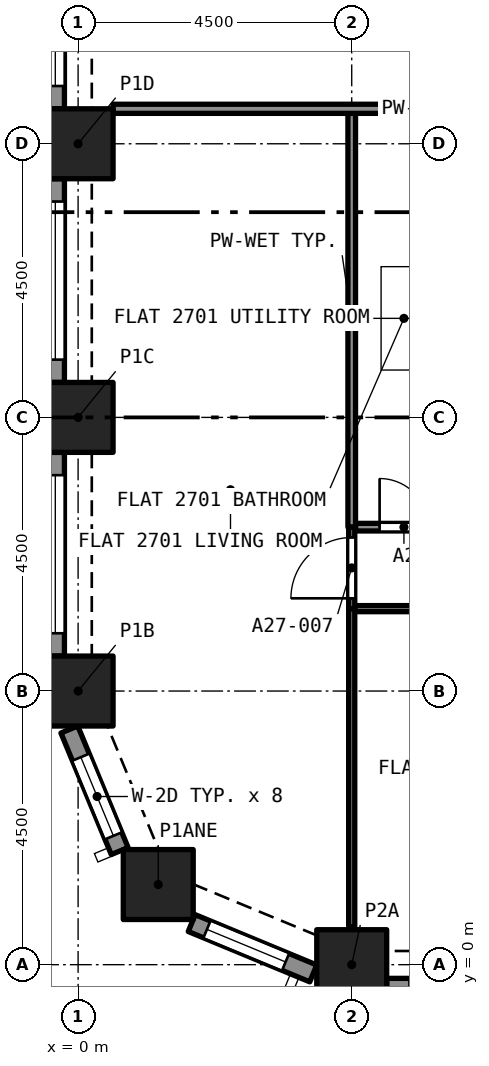
"""IFC4 building model, lengths in metres.
Left out: names, types, materials, properties, quantities, classifications, styles, units other than length and angle.
Written with IfcOpenShell. Run it as: python <this file> out.ifc"""

import sys

from ifc_helpers import new_model, si_unit, direction, frame, frame_2d, origin, origin_2d, place, context, subcontext, project, spatial, rectangle, extrude, element, fill, save


model = new_model("IFC4")
c1 = context("Model", 3, precision=1e-05, world=origin(), true_north=direction((0.0, 1.0)))
c2 = subcontext(c1, "Body", "Model", "MODEL_VIEW")
j1 = project(units=[si_unit("LENGTHUNIT", "METRE"), si_unit("PLANEANGLEUNIT", "RADIAN")], contexts=[c1])
p1 = place(None, origin())
s1 = spatial("IfcSite", under=j1, at=p1, CompositionType="ELEMENT")
p2 = place(p1, origin())
s2 = spatial("IfcBuilding", under=s1, at=p2, CompositionType="ELEMENT")
p3 = place(p2, frame((0.0, 0.0, 99.2)))
s3 = spatial("IfcBuildingStorey", under=s2, at=p3, CompositionType="ELEMENT", Elevation=99.2)
for number, where, z_axis, x_axis in (
    (1, (4.5, 0.0, 0.0), (0.0, 0.0, 1.0), (1.0, 0.0, 0.0)),
    (2, (1.318, 1.318, 0.0), (0.0, 0.0, 1.0), (1.0, 0.0, 0.0)),
    (3, (0.0, 4.5, 0.0), (0.0, 0.0, 1.0), (1.0, 0.0, 0.0)),
    (4, (0.0, 9.0, 0.0), (0.0, 0.0, 1.0), (1.0, 0.0, 0.0)),
    (5, (0.0, 13.5, 0.0), (0.0, 0.0, 1.0), (1.0, 0.0, 0.0)),
):
    element("IfcColumn", number, at=place(p3, frame(where, z_axis=z_axis, x_axis=x_axis)), inside=s3, PredefinedType="COLUMN", context=c2, shape_type="SweptSolid", body=[
        extrude(rectangle(XDim=1.15, YDim=1.15, at=origin_2d()), origin(), (0.0, 0.0, 1.0), 3.2),
    ])
p4 = place(p3, frame((0.684, 1.869, 0.0), z_axis=(0.0, 0.0, 1.0), x_axis=(-0.382723818695, 0.923862802911, 0.0)))
e6 = element("IfcWall", 6, at=p4, inside=s3, PredefinedType="SOLIDWALL", context=c2, shape_type="SweptSolid", body=[
    extrude(rectangle(XDim=2.164, YDim=0.3, at=frame_2d((1.082, 0.0))), origin(), (0.0, 0.0, 1.0), 3.2),
])
p5 = place(p4, frame((0.271, 0.0, 0.45)))
e7 = element("IfcOpeningElement", 7, at=p5, cuts=e6, PredefinedType="OPENING", context=c2, shape_type="SweptSolid", body=[
    extrude(rectangle(XDim=1.4, YDim=1.95, at=frame_2d((0.7, 0.975))), frame((0.0, 0.16, 0.0), z_axis=(0.0, -1.0, 0.0), x_axis=(1.0, 0.0, 0.0)), (0.0, 0.0, 1.0), 0.32),
])
p6 = place(p3, frame((3.868, -0.144, 0.0), z_axis=(0.0, 0.0, 1.0), x_axis=(-0.923862802911, 0.382723818695, 0.0)))
e8 = element("IfcWall", 8, at=p6, inside=s3, PredefinedType="SOLIDWALL", context=c2, shape_type="SweptSolid", body=[
    extrude(rectangle(XDim=2.164, YDim=0.3, at=frame_2d((1.082, 0.0))), origin(), (0.0, 0.0, 1.0), 3.2),
])
p7 = place(p6, frame((0.493, 0.0, 0.45)))
e9 = element("IfcOpeningElement", 9, at=p7, cuts=e8, PredefinedType="OPENING", context=c2, shape_type="SweptSolid", body=[
    extrude(rectangle(XDim=1.4, YDim=1.95, at=frame_2d((0.7, 0.975))), frame((0.0, 0.16, 0.0), z_axis=(0.0, -1.0, 0.0), x_axis=(1.0, 0.0, 0.0)), (0.0, 0.0, 1.0), 0.32),
])
p8 = place(p3, frame((8.425, -0.375, 0.0), z_axis=(0.0, 0.0, 1.0), x_axis=(-1.0, 0.0, 0.0)))
e10 = element("IfcWall", 10, at=p8, inside=s3, PredefinedType="SOLIDWALL", context=c2, shape_type="SweptSolid", body=[
    extrude(rectangle(XDim=3.35, YDim=0.3, at=frame_2d((1.675, 0.0))), origin(), (0.0, 0.0, 1.0), 3.2),
])
p9 = place(p8, frame((0.375, 0.0, 0.45)))
e11 = element("IfcOpeningElement", 11, at=p9, cuts=e10, PredefinedType="OPENING", context=c2, shape_type="SweptSolid", body=[
    extrude(rectangle(XDim=2.6, YDim=1.95, at=frame_2d((1.3, 0.975))), frame((0.0, 0.16, 0.0), z_axis=(0.0, -1.0, 0.0), x_axis=(1.0, 0.0, 0.0)), (0.0, 0.0, 1.0), 0.32),
])
p10 = place(p3, frame((-0.375, 14.075, 0.0), z_axis=(0.0, 0.0, 1.0), x_axis=(0.0, 1.0, 0.0)))
e12 = element("IfcWall", 12, at=p10, inside=s3, PredefinedType="SOLIDWALL", context=c2, shape_type="SweptSolid", body=[
    extrude(rectangle(XDim=3.35, YDim=0.3, at=frame_2d((1.675, 0.0))), origin(), (0.0, 0.0, 1.0), 3.2),
])
p11 = place(p10, frame((0.375, 0.0, 0.45)))
e13 = element("IfcOpeningElement", 13, at=p11, cuts=e12, PredefinedType="OPENING", context=c2, shape_type="SweptSolid", body=[
    extrude(rectangle(XDim=2.6, YDim=1.95, at=frame_2d((1.3, 0.975))), frame((0.0, 0.16, 0.0), z_axis=(0.0, -1.0, 0.0), x_axis=(1.0, 0.0, 0.0)), (0.0, 0.0, 1.0), 0.32),
])
p12 = place(p3, frame((-0.375, 9.575, 0.0), z_axis=(0.0, 0.0, 1.0), x_axis=(0.0, 1.0, 0.0)))
e14 = element("IfcWall", 14, at=p12, inside=s3, PredefinedType="SOLIDWALL", context=c2, shape_type="SweptSolid", body=[
    extrude(rectangle(XDim=3.35, YDim=0.3, at=frame_2d((1.675, 0.0))), origin(), (0.0, 0.0, 1.0), 3.2),
])
p13 = place(p12, frame((0.375, 0.0, 0.45)))
e15 = element("IfcOpeningElement", 15, at=p13, cuts=e14, PredefinedType="OPENING", context=c2, shape_type="SweptSolid", body=[
    extrude(rectangle(XDim=2.6, YDim=1.95, at=frame_2d((1.3, 0.975))), frame((0.0, 0.16, 0.0), z_axis=(0.0, -1.0, 0.0), x_axis=(1.0, 0.0, 0.0)), (0.0, 0.0, 1.0), 0.32),
])
p14 = place(p3, frame((-0.375, 5.075, 0.0), z_axis=(0.0, 0.0, 1.0), x_axis=(0.0, 1.0, 0.0)))
e16 = element("IfcWall", 16, at=p14, inside=s3, PredefinedType="SOLIDWALL", context=c2, shape_type="SweptSolid", body=[
    extrude(rectangle(XDim=3.35, YDim=0.3, at=frame_2d((1.675, 0.0))), origin(), (0.0, 0.0, 1.0), 3.2),
])
p15 = place(p14, frame((0.375, 0.0, 0.45)))
e17 = element("IfcOpeningElement", 17, at=p15, cuts=e16, PredefinedType="OPENING", context=c2, shape_type="SweptSolid", body=[
    extrude(rectangle(XDim=2.6, YDim=1.95, at=frame_2d((1.3, 0.975))), frame((0.0, 0.16, 0.0), z_axis=(0.0, -1.0, 0.0), x_axis=(1.0, 0.0, 0.0)), (0.0, 0.0, 1.0), 0.32),
])
p16 = place(p3, frame((4.562, 7.195, 0.0), z_axis=(0.0, 0.0, 1.0), x_axis=(1.0, 0.0, 0.0)))
e18 = element("IfcWall", 18, at=p16, inside=s3, PredefinedType="PARTITIONING", context=c2, shape_type="SweptSolid", body=[
    extrude(rectangle(XDim=1.655, YDim=0.125, at=frame_2d((0.827, 0.0))), origin(), (0.0, 0.0, 1.0), 2.9),
])
p17 = place(p16, frame((0.396, 0.0, 0.0)))
e19 = element("IfcOpeningElement", 19, at=p17, cuts=e18, PredefinedType="OPENING", context=c2, shape_type="SweptSolid", body=[
    extrude(rectangle(XDim=0.8, YDim=2.1, at=frame_2d((0.4, 1.05))), frame((0.0, 0.073, 0.0), z_axis=(0.0, -1.0, 0.0), x_axis=(1.0, 0.0, 0.0)), (0.0, 0.0, 1.0), 0.145),
])
p18 = place(p3, frame((4.5, 7.195, 0.0), z_axis=(0.0, 0.0, 1.0), x_axis=(0.0, 1.0, 0.0)))
e20 = element("IfcWall", 20, at=p18, inside=s3, PredefinedType="PARTITIONING", context=c2, shape_type="SweptSolid", body=[
    extrude(rectangle(XDim=6.805, YDim=0.125, at=frame_2d((3.402, 0.0))), origin(), (0.0, 0.0, 1.0), 2.9),
])
p19 = place(p3, frame((9.0, 5.855, 0.0), z_axis=(0.0, 0.0, 1.0), x_axis=(-1.0, 0.0, 0.0)))
e21 = element("IfcWall", 21, at=p19, inside=s3, PredefinedType="PARTITIONING", context=c2, shape_type="SweptSolid", body=[
    extrude(rectangle(XDim=4.45, YDim=0.1, at=frame_2d((2.225, 0.0))), origin(), (0.0, 0.0, 1.0), 2.9),
])
p20 = place(p19, frame((1.8, 0.0, 0.0)))
e22 = element("IfcOpeningElement", 22, at=p20, cuts=e21, PredefinedType="OPENING", context=c2, shape_type="SweptSolid", body=[
    extrude(rectangle(XDim=0.9, YDim=2.1, at=frame_2d((0.45, 1.05))), frame((0.0, 0.06, 0.0), z_axis=(0.0, -1.0, 0.0), x_axis=(1.0, 0.0, 0.0)), (0.0, 0.0, 1.0), 0.12),
])
p21 = place(p3, frame((4.5, 0.622, 0.0), z_axis=(0.0, 0.0, 1.0), x_axis=(0.0, 1.0, 0.0)))
e23 = element("IfcWall", 23, at=p21, inside=s3, PredefinedType="PARTITIONING", context=c2, shape_type="SweptSolid", body=[
    extrude(rectangle(XDim=5.233, YDim=0.1, at=frame_2d((2.616, 0.0))), origin(), (0.0, 0.0, 1.0), 2.9),
])
p22 = place(p3, frame((4.5, 5.855, 0.0), z_axis=(0.0, 0.0, 1.0), x_axis=(0.0, 1.0, 0.0)))
e24 = element("IfcWall", 24, at=p22, inside=s3, PredefinedType="PARTITIONING", context=c2, shape_type="SweptSolid", body=[
    extrude(rectangle(XDim=1.34, YDim=0.1, at=frame_2d((0.67, 0.0))), origin(), (0.0, 0.0, 1.0), 2.9),
])
p23 = place(p22, frame((0.17, 0.0, 0.0)))
e25 = element("IfcOpeningElement", 25, at=p23, cuts=e24, PredefinedType="OPENING", context=c2, shape_type="SweptSolid", body=[
    extrude(rectangle(XDim=1.0, YDim=2.1, at=frame_2d((0.5, 1.05))), frame((0.0, 0.06, 0.0), z_axis=(0.0, -1.0, 0.0), x_axis=(1.0, 0.0, 0.0)), (0.0, 0.0, 1.0), 0.12),
])
p24 = place(p3, frame((0.575, 14.075, 0.0), z_axis=(0.0, 0.0, 1.0), x_axis=(1.0, 0.0, 0.0)))
e26 = element("IfcWall", 26, at=p24, inside=s3, PredefinedType="PARTITIONING", context=c2, shape_type="SweptSolid", body=[
    extrude(rectangle(XDim=13.45, YDim=0.15, at=frame_2d((6.725, 0.0))), origin(), (0.0, 0.0, 1.0), 2.9),
])
p25 = place(p5, origin())
e27 = element("IfcWindow", 27, at=p25, inside=s3, PartitioningType="SINGLE_PANEL", PredefinedType="WINDOW", context=c2, shape_type="SweptSolid", body=[
    extrude(rectangle(XDim=1.4, YDim=1.95, at=frame_2d((0.7, 0.975))), frame((0.0, 0.03, 0.0), z_axis=(0.0, -1.0, 0.0), x_axis=(1.0, 0.0, 0.0)), (0.0, 0.0, 1.0), 0.06),
])
fill(e7, e27)
p26 = place(p7, origin())
e28 = element("IfcWindow", 28, at=p26, inside=s3, PartitioningType="SINGLE_PANEL", PredefinedType="WINDOW", context=c2, shape_type="SweptSolid", body=[
    extrude(rectangle(XDim=1.4, YDim=1.95, at=frame_2d((0.7, 0.975))), frame((0.0, 0.03, 0.0), z_axis=(0.0, -1.0, 0.0), x_axis=(1.0, 0.0, 0.0)), (0.0, 0.0, 1.0), 0.06),
])
fill(e9, e28)
p27 = place(p11, origin())
e29 = element("IfcWindow", 29, at=p27, inside=s3, PartitioningType="SINGLE_PANEL", PredefinedType="WINDOW", context=c2, shape_type="SweptSolid", body=[
    extrude(rectangle(XDim=2.6, YDim=1.95, at=frame_2d((1.3, 0.975))), frame((0.0, 0.03, 0.0), z_axis=(0.0, -1.0, 0.0), x_axis=(1.0, 0.0, 0.0)), (0.0, 0.0, 1.0), 0.06),
])
fill(e13, e29)
p28 = place(p13, origin())
e30 = element("IfcWindow", 30, at=p28, inside=s3, PartitioningType="SINGLE_PANEL", PredefinedType="WINDOW", context=c2, shape_type="SweptSolid", body=[
    extrude(rectangle(XDim=2.6, YDim=1.95, at=frame_2d((1.3, 0.975))), frame((0.0, 0.03, 0.0), z_axis=(0.0, -1.0, 0.0), x_axis=(1.0, 0.0, 0.0)), (0.0, 0.0, 1.0), 0.06),
])
fill(e15, e30)
p29 = place(p15, origin())
e31 = element("IfcWindow", 31, at=p29, inside=s3, PartitioningType="SINGLE_PANEL", PredefinedType="WINDOW", context=c2, shape_type="SweptSolid", body=[
    extrude(rectangle(XDim=2.6, YDim=1.95, at=frame_2d((1.3, 0.975))), frame((0.0, 0.03, 0.0), z_axis=(0.0, -1.0, 0.0), x_axis=(1.0, 0.0, 0.0)), (0.0, 0.0, 1.0), 0.06),
])
fill(e17, e31)
p30 = place(p17, origin())
e32 = element("IfcDoor", 32, at=p30, inside=s3, OperationType="SINGLE_SWING_LEFT", PredefinedType="DOOR", context=c2, shape_type="SweptSolid", body=[
    extrude(rectangle(XDim=0.8, YDim=2.1, at=frame_2d((0.4, 1.05))), frame((0.0, 0.025, 0.0), z_axis=(0.0, -1.0, 0.0), x_axis=(1.0, 0.0, 0.0)), (0.0, 0.0, 1.0), 0.05),
])
fill(e19, e32)
p31 = place(p23, origin())
e33 = element("IfcDoor", 33, at=p31, inside=s3, OperationType="SINGLE_SWING_RIGHT", PredefinedType="DOOR", context=c2, shape_type="SweptSolid", body=[
    extrude(rectangle(XDim=1.0, YDim=2.1, at=frame_2d((0.5, 1.05))), frame((0.0, 0.025, 0.0), z_axis=(0.0, -1.0, 0.0), x_axis=(1.0, 0.0, 0.0)), (0.0, 0.0, 1.0), 0.05),
])
fill(e25, e33)
save(model, sys.argv[1])
